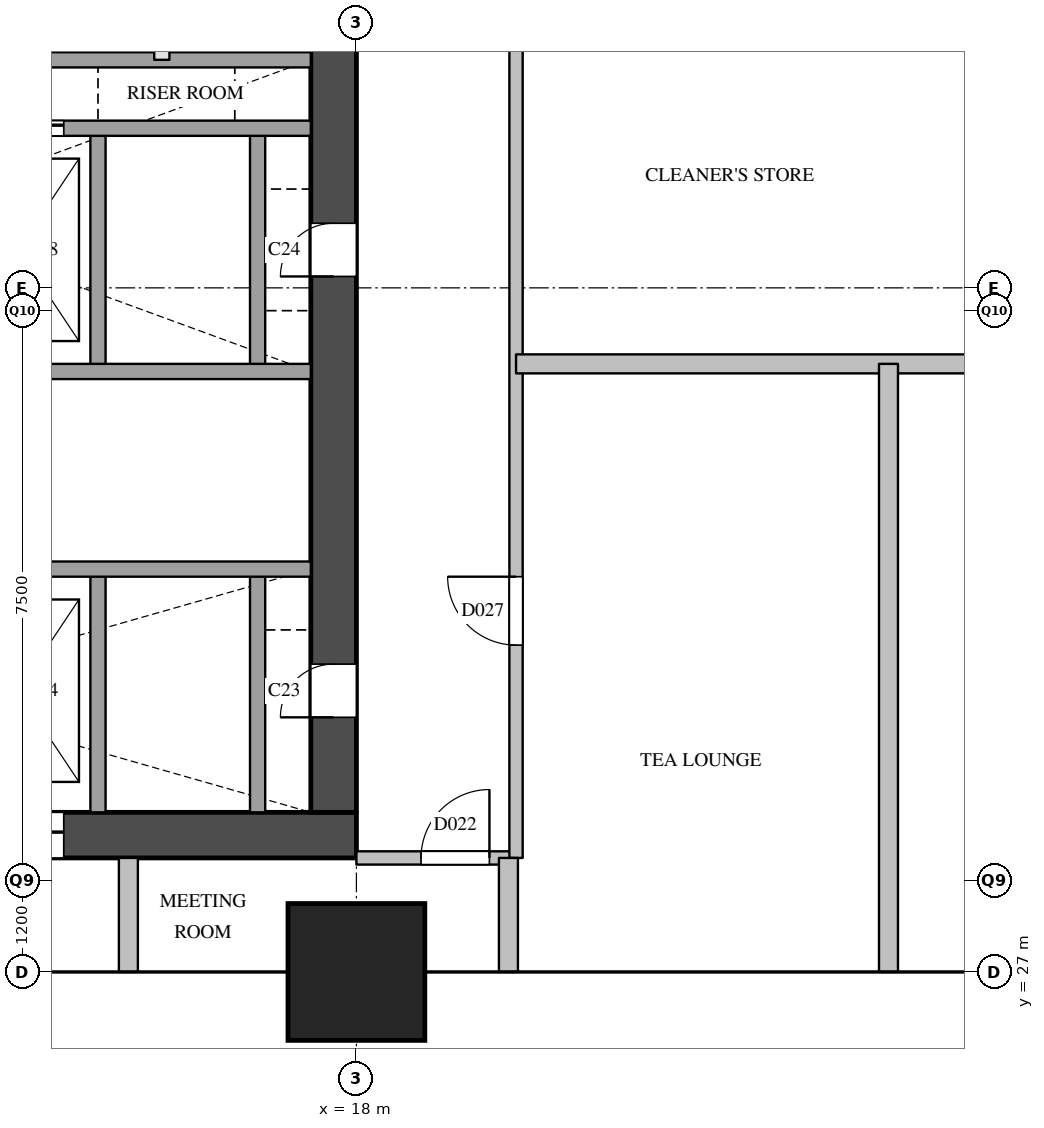
"""IFC4 building model, lengths in metres.
Left out: names, types, materials, properties, quantities, classifications, styles, units other than length and angle.
Written with IfcOpenShell. Run it as: python <this file> out.ifc"""

import sys

from ifc_helpers import new_model, si_unit, direction, frame, frame_2d, origin, origin_2d, place, context, subcontext, project, spatial, rectangle, extrude, element, fill, save


model = new_model("IFC4")
c1 = context("Model", 3, precision=1e-05, world=origin(), true_north=direction((0.0, 1.0)))
c2 = subcontext(c1, "Body", "Model", "MODEL_VIEW")
j1 = project(units=[si_unit("LENGTHUNIT", "METRE"), si_unit("PLANEANGLEUNIT", "RADIAN")], contexts=[c1])
p1 = place(None, origin())
s1 = spatial("IfcSite", under=j1, at=p1, CompositionType="ELEMENT")
p2 = place(p1, origin())
s2 = spatial("IfcBuilding", under=s1, at=p2, CompositionType="ELEMENT")
p3 = place(p2, frame((0.0, 0.0, 85.4)))
s3 = spatial("IfcBuildingStorey", under=s2, at=p3, CompositionType="ELEMENT", Elevation=85.4)
p4 = place(p3, frame((18.0, 27.0, 0.0), z_axis=(0.0, 0.0, 1.0), x_axis=(1.0, 0.0, 0.0)))
e1 = element("IfcColumn", 1, at=p4, inside=s3, PredefinedType="COLUMN", context=c2, shape_type="SweptSolid", body=[
    extrude(rectangle(XDim=1.8, YDim=1.8, at=origin_2d()), origin(), (0.0, 0.0, 1.0), 3.8),
])
p5 = place(p3, frame((5.6, 28.8, 0.0), z_axis=(0.0, 0.0, 1.0), x_axis=(1.0, 0.0, 0.0)))
e2 = element("IfcWall", 2, at=p5, inside=s3, PredefinedType="SHEAR", context=c2, shape_type="SweptSolid", body=[
    extrude(rectangle(XDim=12.4, YDim=0.6, at=frame_2d((6.2, 0.0))), origin(), (0.0, 0.0, 1.0), 3.5),
])
p6 = place(p5, frame((1.05, 0.0, 0.0)))
e3 = element("IfcOpeningElement", 3, at=p6, cuts=e2, PredefinedType="OPENING", context=c2, shape_type="SweptSolid", body=[
    extrude(rectangle(XDim=1.2, YDim=2.1, at=frame_2d((0.6, 1.05))), frame((0.0, 0.31, 0.0), z_axis=(0.0, -1.0, 0.0), x_axis=(1.0, 0.0, 0.0)), (0.0, 0.0, 1.0), 0.62),
])
p7 = place(p5, frame((5.25, 0.0, 0.0)))
e4 = element("IfcOpeningElement", 4, at=p7, cuts=e2, PredefinedType="OPENING", context=c2, shape_type="SweptSolid", body=[
    extrude(rectangle(XDim=1.2, YDim=2.1, at=frame_2d((0.6, 1.05))), frame((0.0, 0.31, 0.0), z_axis=(0.0, -1.0, 0.0), x_axis=(1.0, 0.0, 0.0)), (0.0, 0.0, 1.0), 0.62),
])
p8 = place(p5, frame((7.35, 0.0, 0.0)))
e5 = element("IfcOpeningElement", 5, at=p8, cuts=e2, PredefinedType="OPENING", context=c2, shape_type="SweptSolid", body=[
    extrude(rectangle(XDim=1.2, YDim=2.1, at=frame_2d((0.6, 1.05))), frame((0.0, 0.31, 0.0), z_axis=(0.0, -1.0, 0.0), x_axis=(1.0, 0.0, 0.0)), (0.0, 0.0, 1.0), 0.62),
])
p9 = place(p3, frame((17.7, 29.1, 0.0), z_axis=(0.0, 0.0, 1.0), x_axis=(0.0, 1.0, 0.0)))
e6 = element("IfcWall", 6, at=p9, inside=s3, PredefinedType="SHEAR", context=c2, shape_type="SweptSolid", body=[
    extrude(rectangle(XDim=20.3, YDim=0.6, at=frame_2d((10.15, 0.0))), origin(), (0.0, 0.0, 1.0), 3.5),
])
p10 = place(p9, frame((1.25, 0.0, 0.0)))
e7 = element("IfcOpeningElement", 7, at=p10, cuts=e6, PredefinedType="OPENING", context=c2, shape_type="SweptSolid", body=[
    extrude(rectangle(XDim=0.7, YDim=2.1, at=frame_2d((0.35, 1.05))), frame((0.0, 0.31, 0.0), z_axis=(0.0, -1.0, 0.0), x_axis=(1.0, 0.0, 0.0)), (0.0, 0.0, 1.0), 0.62),
])
p11 = place(p9, frame((7.05, 0.0, 0.0)))
e8 = element("IfcOpeningElement", 8, at=p11, cuts=e6, PredefinedType="OPENING", context=c2, shape_type="SweptSolid", body=[
    extrude(rectangle(XDim=0.7, YDim=2.1, at=frame_2d((0.35, 1.05))), frame((0.0, 0.31, 0.0), z_axis=(0.0, -1.0, 0.0), x_axis=(1.0, 0.0, 0.0)), (0.0, 0.0, 1.0), 0.62),
])
p12 = place(p3, frame((14.6, 29.1, 0.0), z_axis=(0.0, 0.0, 1.0), x_axis=(0.0, 1.0, 0.0)))
e9 = element("IfcWall", 9, at=p12, inside=s3, PredefinedType="SOLIDWALL", context=c2, shape_type="SweptSolid", body=[
    extrude(rectangle(XDim=3.2, YDim=0.2, at=frame_2d((1.6, 0.0))), origin(), (0.0, 0.0, 1.0), 3.5),
])
p13 = place(p3, frame((14.6, 34.9, 0.0), z_axis=(0.0, 0.0, 1.0), x_axis=(0.0, 1.0, 0.0)))
e10 = element("IfcWall", 10, at=p13, inside=s3, PredefinedType="SOLIDWALL", context=c2, shape_type="SweptSolid", body=[
    extrude(rectangle(XDim=3.2, YDim=0.2, at=frame_2d((1.6, 0.0))), origin(), (0.0, 0.0, 1.0), 3.5),
])
p14 = place(p3, frame((15.44, 39.0, 0.0), z_axis=(0.0, 0.0, 1.0), x_axis=(0.0, 1.0, 0.0)))
e11 = element("IfcWall", 11, at=p14, inside=s3, PredefinedType="PARTITIONING", context=c2, shape_type="SweptSolid", body=[
    extrude(rectangle(XDim=6.2, YDim=0.2, at=frame_2d((3.1, 0.0))), origin(), (0.0, 0.0, 1.0), 3.5),
])
p15 = place(p3, frame((16.7, 29.1, 0.0), z_axis=(0.0, 0.0, 1.0), x_axis=(0.0, 1.0, 0.0)))
e12 = element("IfcWall", 12, at=p15, inside=s3, PredefinedType="SOLIDWALL", context=c2, shape_type="SweptSolid", body=[
    extrude(rectangle(XDim=3.2, YDim=0.2, at=frame_2d((1.6, 0.0))), origin(), (0.0, 0.0, 1.0), 3.5),
])
p16 = place(p3, frame((16.7, 34.9, 0.0), z_axis=(0.0, 0.0, 1.0), x_axis=(0.0, 1.0, 0.0)))
e13 = element("IfcWall", 13, at=p16, inside=s3, PredefinedType="SOLIDWALL", context=c2, shape_type="SweptSolid", body=[
    extrude(rectangle(XDim=3.2, YDim=0.2, at=frame_2d((1.6, 0.0))), origin(), (0.0, 0.0, 1.0), 3.5),
])
p17 = place(p3, frame((6.2, 32.3, 0.0), z_axis=(0.0, 0.0, 1.0), x_axis=(1.0, 0.0, 0.0)))
e14 = element("IfcWall", 14, at=p17, inside=s3, PredefinedType="SOLIDWALL", context=c2, shape_type="SweptSolid", body=[
    extrude(rectangle(XDim=11.2, YDim=0.2, at=frame_2d((5.6, 0.0))), origin(), (0.0, 0.0, 1.0), 3.5),
])
p18 = place(p17, frame((2.55, 0.0, 0.0)))
e15 = element("IfcOpeningElement", 15, at=p18, cuts=e14, PredefinedType="OPENING", context=c2, shape_type="SweptSolid", body=[
    extrude(rectangle(XDim=1.2, YDim=2.1, at=frame_2d((0.6, 1.05))), frame((0.0, 0.11, 0.0), z_axis=(0.0, -1.0, 0.0), x_axis=(1.0, 0.0, 0.0)), (0.0, 0.0, 1.0), 0.22),
])
p19 = place(p3, frame((6.2, 34.9, 0.0), z_axis=(0.0, 0.0, 1.0), x_axis=(1.0, 0.0, 0.0)))
e16 = element("IfcWall", 16, at=p19, inside=s3, PredefinedType="SOLIDWALL", context=c2, shape_type="SweptSolid", body=[
    extrude(rectangle(XDim=11.2, YDim=0.2, at=frame_2d((5.6, 0.0))), origin(), (0.0, 0.0, 1.0), 3.5),
])
p20 = place(p3, frame((6.2, 38.1, 0.0), z_axis=(0.0, 0.0, 1.0), x_axis=(1.0, 0.0, 0.0)))
e17 = element("IfcWall", 17, at=p20, inside=s3, PredefinedType="SOLIDWALL", context=c2, shape_type="SweptSolid", body=[
    extrude(rectangle(XDim=11.2, YDim=0.2, at=frame_2d((5.6, 0.0))), origin(), (0.0, 0.0, 1.0), 3.5),
])
p21 = place(p20, frame((0.45, 0.0, 0.0)))
e18 = element("IfcOpeningElement", 18, at=p21, cuts=e17, PredefinedType="OPENING", context=c2, shape_type="SweptSolid", body=[
    extrude(rectangle(XDim=1.2, YDim=2.1, at=frame_2d((0.6, 1.05))), frame((0.0, 0.11, 0.0), z_axis=(0.0, -1.0, 0.0), x_axis=(1.0, 0.0, 0.0)), (0.0, 0.0, 1.0), 0.22),
])
p22 = place(p20, frame((2.55, 0.0, 0.0)))
e19 = element("IfcOpeningElement", 19, at=p22, cuts=e17, PredefinedType="OPENING", context=c2, shape_type="SweptSolid", body=[
    extrude(rectangle(XDim=1.2, YDim=2.1, at=frame_2d((0.6, 1.05))), frame((0.0, 0.11, 0.0), z_axis=(0.0, -1.0, 0.0), x_axis=(1.0, 0.0, 0.0)), (0.0, 0.0, 1.0), 0.22),
])
p23 = place(p20, frame((4.65, 0.0, 0.0)))
e20 = element("IfcOpeningElement", 20, at=p23, cuts=e17, PredefinedType="OPENING", context=c2, shape_type="SweptSolid", body=[
    extrude(rectangle(XDim=1.2, YDim=2.1, at=frame_2d((0.6, 1.05))), frame((0.0, 0.11, 0.0), z_axis=(0.0, -1.0, 0.0), x_axis=(1.0, 0.0, 0.0)), (0.0, 0.0, 1.0), 0.22),
])
p24 = place(p20, frame((6.75, 0.0, 0.0)))
e21 = element("IfcOpeningElement", 21, at=p24, cuts=e17, PredefinedType="OPENING", context=c2, shape_type="SweptSolid", body=[
    extrude(rectangle(XDim=1.2, YDim=2.1, at=frame_2d((0.6, 1.05))), frame((0.0, 0.11, 0.0), z_axis=(0.0, -1.0, 0.0), x_axis=(1.0, 0.0, 0.0)), (0.0, 0.0, 1.0), 0.22),
])
p25 = place(p3, frame((12.5, 39.0, 0.0), z_axis=(0.0, 0.0, 1.0), x_axis=(1.0, 0.0, 0.0)))
e22 = element("IfcWall", 22, at=p25, inside=s3, PredefinedType="SOLIDWALL", context=c2, shape_type="SweptSolid", body=[
    extrude(rectangle(XDim=4.9, YDim=0.2, at=frame_2d((2.45, 0.0))), origin(), (0.0, 0.0, 1.0), 3.5),
])
p26 = place(p3, frame((18.0, 28.5, 0.0), z_axis=(0.0, 0.0, 1.0), x_axis=(1.0, 0.0, 0.0)))
e23 = element("IfcWall", 23, at=p26, inside=s3, PredefinedType="PARTITIONING", context=c2, shape_type="SweptSolid", body=[
    extrude(rectangle(XDim=2.1, YDim=0.175, at=frame_2d((1.05, 0.0))), origin(), (0.0, 0.0, 1.0), 3.5),
])
p27 = place(p26, frame((0.85, 0.0, 0.0)))
e24 = element("IfcOpeningElement", 24, at=p27, cuts=e23, PredefinedType="OPENING", context=c2, shape_type="SweptSolid", body=[
    extrude(rectangle(XDim=0.9, YDim=2.1, at=frame_2d((0.45, 1.05))), frame((0.0, 0.097, 0.0), z_axis=(0.0, -1.0, 0.0), x_axis=(1.0, 0.0, 0.0)), (0.0, 0.0, 1.0), 0.195),
])
p28 = place(p3, frame((20.1, 28.5, 0.0), z_axis=(0.0, 0.0, 1.0), x_axis=(0.0, 1.0, 0.0)))
e25 = element("IfcWall", 25, at=p28, inside=s3, PredefinedType="PARTITIONING", context=c2, shape_type="SweptSolid", body=[
    extrude(rectangle(XDim=23.6, YDim=0.175, at=frame_2d((11.8, 0.0))), origin(), (0.0, 0.0, 1.0), 3.5),
])
p29 = place(p28, frame((2.8, 0.0, 0.0)))
e26 = element("IfcOpeningElement", 26, at=p29, cuts=e25, PredefinedType="OPENING", context=c2, shape_type="SweptSolid", body=[
    extrude(rectangle(XDim=0.9, YDim=2.1, at=frame_2d((0.45, 1.05))), frame((0.0, 0.097, 0.0), z_axis=(0.0, -1.0, 0.0), x_axis=(1.0, 0.0, 0.0)), (0.0, 0.0, 1.0), 0.195),
])
p30 = place(p28, frame((19.6, 0.0, 0.0)))
e27 = element("IfcOpeningElement", 27, at=p30, cuts=e25, PredefinedType="OPENING", context=c2, shape_type="SweptSolid", body=[
    extrude(rectangle(XDim=0.9, YDim=2.1, at=frame_2d((0.45, 1.05))), frame((0.0, 0.097, 0.0), z_axis=(0.0, -1.0, 0.0), x_axis=(1.0, 0.0, 0.0)), (0.0, 0.0, 1.0), 0.195),
])
p31 = place(p3, frame((20.1, 35.0, 0.0), z_axis=(0.0, 0.0, 1.0), x_axis=(1.0, 0.0, 0.0)))
e28 = element("IfcWall", 28, at=p31, inside=s3, PredefinedType="PARTITIONING", context=c2, shape_type="SweptSolid", body=[
    extrude(rectangle(XDim=13.8, YDim=0.25, at=frame_2d((6.9, 0.0))), origin(), (0.0, 0.0, 1.0), 2.5),
])
for number, where, z_axis, x_axis in (
    (29, (15.0, 27.0, 0.0), (0.0, 0.0, 1.0), (0.0, 1.0, 0.0)),
    (30, (20.0, 27.0, 0.0), (0.0, 0.0, 1.0), (0.0, 1.0, 0.0)),
):
    element("IfcWall", number, at=place(p3, frame(where, z_axis=z_axis, x_axis=x_axis)), inside=s3, PredefinedType="PARTITIONING", context=c2, shape_type="SweptSolid", body=[
        extrude(rectangle(XDim=1.5, YDim=0.25, at=frame_2d((0.75, 0.0))), origin(), (0.0, 0.0, 1.0), 2.5),
    ])
p32 = place(p3, frame((25.0, 27.0, 0.0), z_axis=(0.0, 0.0, 1.0), x_axis=(0.0, 1.0, 0.0)))
e31 = element("IfcWall", 31, at=p32, inside=s3, PredefinedType="PARTITIONING", context=c2, shape_type="SweptSolid", body=[
    extrude(rectangle(XDim=8.0, YDim=0.25, at=frame_2d((4.0, 0.0))), origin(), (0.0, 0.0, 1.0), 2.5),
])
p33 = place(p8, origin())
e32 = element("IfcDoor", 32, at=p33, inside=s3, OperationType="SLIDING_TO_LEFT", PredefinedType="DOOR", context=c2, shape_type="SweptSolid", body=[
    extrude(rectangle(XDim=1.2, YDim=2.1, at=frame_2d((0.6, 1.05))), frame((0.0, 0.025, 0.0), z_axis=(0.0, -1.0, 0.0), x_axis=(1.0, 0.0, 0.0)), (0.0, 0.0, 1.0), 0.05),
])
fill(e5, e32)
p34 = place(p24, origin())
e33 = element("IfcDoor", 33, at=p34, inside=s3, OperationType="SLIDING_TO_LEFT", PredefinedType="DOOR", context=c2, shape_type="SweptSolid", body=[
    extrude(rectangle(XDim=1.2, YDim=2.1, at=frame_2d((0.6, 1.05))), frame((0.0, 0.025, 0.0), z_axis=(0.0, -1.0, 0.0), x_axis=(1.0, 0.0, 0.0)), (0.0, 0.0, 1.0), 0.05),
])
fill(e21, e33)
p35 = place(p10, origin())
e34 = element("IfcDoor", 34, at=p35, inside=s3, OperationType="SINGLE_SWING_LEFT", PredefinedType="DOOR", context=c2, shape_type="SweptSolid", body=[
    extrude(rectangle(XDim=0.7, YDim=2.1, at=frame_2d((0.35, 1.05))), frame((0.0, 0.025, 0.0), z_axis=(0.0, -1.0, 0.0), x_axis=(1.0, 0.0, 0.0)), (0.0, 0.0, 1.0), 0.05),
])
fill(e7, e34)
p36 = place(p11, origin())
e35 = element("IfcDoor", 35, at=p36, inside=s3, OperationType="SINGLE_SWING_LEFT", PredefinedType="DOOR", context=c2, shape_type="SweptSolid", body=[
    extrude(rectangle(XDim=0.7, YDim=2.1, at=frame_2d((0.35, 1.05))), frame((0.0, 0.025, 0.0), z_axis=(0.0, -1.0, 0.0), x_axis=(1.0, 0.0, 0.0)), (0.0, 0.0, 1.0), 0.05),
])
fill(e8, e35)
p37 = place(p27, origin())
e36 = element("IfcDoor", 36, at=p37, inside=s3, OperationType="SINGLE_SWING_RIGHT", PredefinedType="DOOR", context=c2, shape_type="SweptSolid", body=[
    extrude(rectangle(XDim=0.9, YDim=2.1, at=frame_2d((0.45, 1.05))), frame((0.0, 0.025, 0.0), z_axis=(0.0, -1.0, 0.0), x_axis=(1.0, 0.0, 0.0)), (0.0, 0.0, 1.0), 0.05),
])
fill(e24, e36)
p38 = place(p29, origin())
e37 = element("IfcDoor", 37, at=p38, inside=s3, OperationType="SINGLE_SWING_RIGHT", PredefinedType="DOOR", context=c2, shape_type="SweptSolid", body=[
    extrude(rectangle(XDim=0.9, YDim=2.1, at=frame_2d((0.45, 1.05))), frame((0.0, 0.025, 0.0), z_axis=(0.0, -1.0, 0.0), x_axis=(1.0, 0.0, 0.0)), (0.0, 0.0, 1.0), 0.05),
])
fill(e26, e37)
save(model, sys.argv[1])
